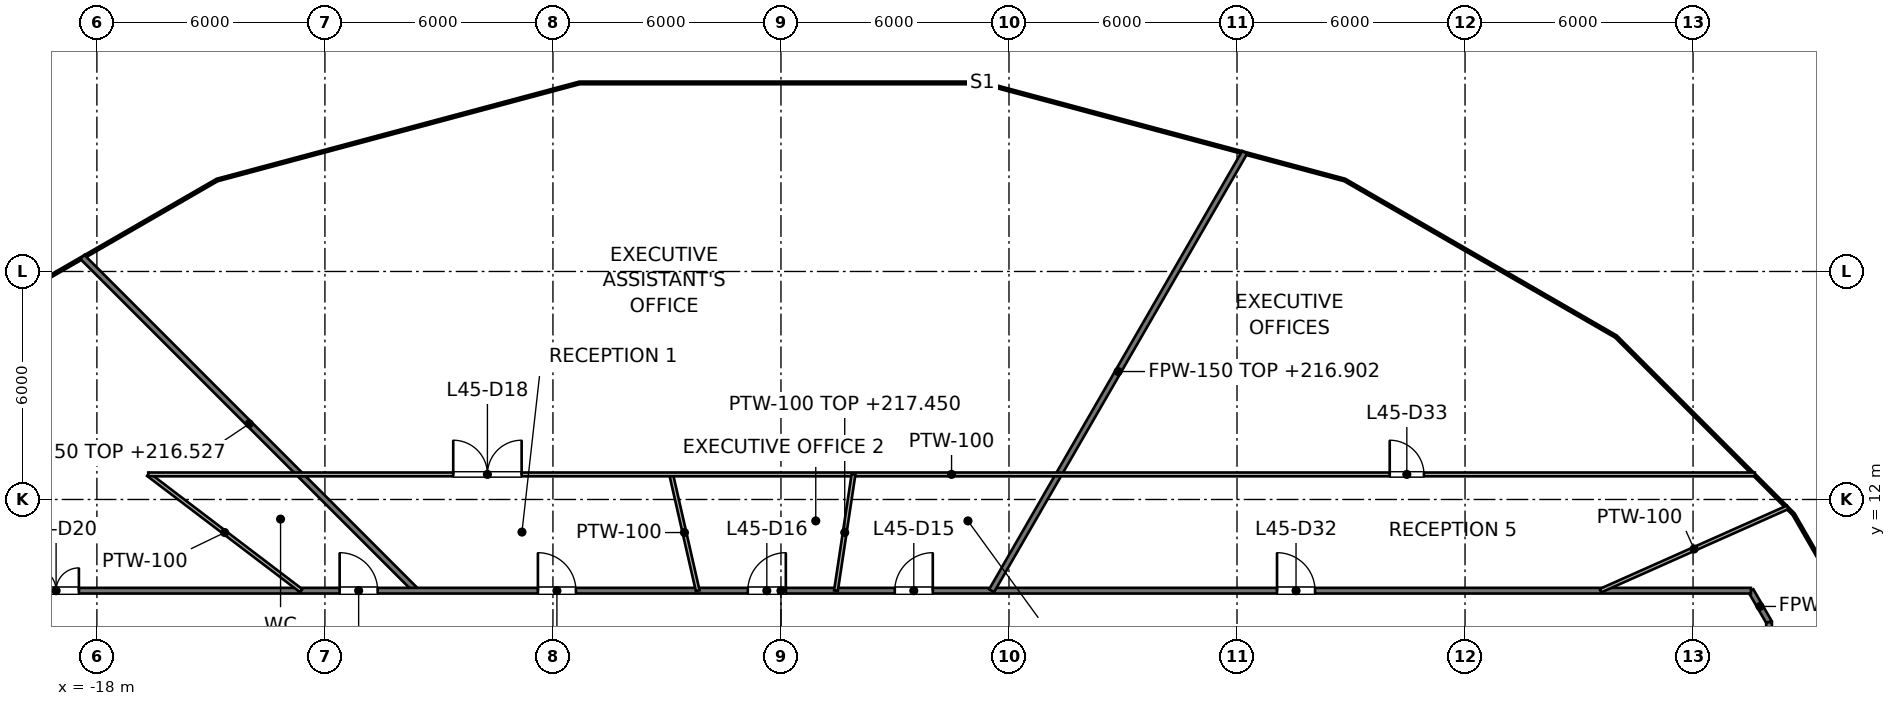
"""IFC4 building model, lengths in metres.
Left out: names, types, materials, properties, quantities, classifications, styles, units other than length and angle.
Written with IfcOpenShell. Run it as: python <this file> out.ifc"""

import sys

from ifc_helpers import new_model, si_unit, direction, frame, frame_2d, origin, place, context, subcontext, project, spatial, rectangle, extrude, element, fill, save


model = new_model("IFC4")
c1 = context("Model", 3, precision=1e-05, world=origin(), true_north=direction((0.0, 1.0)))
c2 = subcontext(c1, "Body", "Model", "MODEL_VIEW")
j1 = project(units=[si_unit("LENGTHUNIT", "METRE"), si_unit("PLANEANGLEUNIT", "RADIAN")], contexts=[c1])
p1 = place(None, origin())
s1 = spatial("IfcSite", under=j1, at=p1, CompositionType="ELEMENT")
p2 = place(p1, origin())
s2 = spatial("IfcBuilding", under=s1, at=p2, CompositionType="ELEMENT")
p3 = place(p2, frame((0.0, 0.0, 213.6)))
s3 = spatial("IfcBuildingStorey", under=s2, at=p3, CompositionType="ELEMENT", Elevation=213.6)
p4 = place(p3, frame((25.522, 9.6, 0.0), z_axis=(0.0, 0.0, 1.0), x_axis=(0.499980071345, -0.866036909293, 0.0)))
e1 = element("IfcWall", 1, at=p4, inside=s3, PredefinedType="PARTITIONING", context=c2, shape_type="SweptSolid", body=[
    extrude(rectangle(XDim=0.957, YDim=0.15, at=frame_2d((0.479, 0.0))), origin(), (0.0, 0.0, 1.0), 3.85),
])
p5 = place(p3, frame((-18.383, 18.383, 0.0), z_axis=(0.0, 0.0, 1.0), x_axis=(0.707106781187, -0.707106781187, 0.0)))
e2 = element("IfcWall", 2, at=p5, inside=s3, PredefinedType="PARTITIONING", context=c2, shape_type="SweptSolid", body=[
    extrude(rectangle(XDim=12.421, YDim=0.15, at=frame_2d((6.21, 0.0))), origin(), (0.0, 0.0, 1.0), 2.927),
])
p6 = place(p3, frame((-25.522, 9.6, 0.0), z_axis=(0.0, 0.0, 1.0), x_axis=(1.0, 0.0, 0.0)))
e3 = element("IfcWall", 3, at=p6, inside=s3, PredefinedType="PARTITIONING", context=c2, shape_type="SweptSolid", body=[
    extrude(rectangle(XDim=51.044, YDim=0.15, at=frame_2d((25.522, 0.0))), origin(), (0.0, 0.0, 1.0), 2.927),
])
p7 = place(p6, frame((28.517, 0.0, 0.0)))
e4 = element("IfcOpeningElement", 4, at=p7, cuts=e3, PredefinedType="OPENING", context=c2, shape_type="SweptSolid", body=[
    extrude(rectangle(XDim=1.0, YDim=2.1, at=frame_2d((0.5, 1.05))), frame((0.0, 0.075, 0.0), z_axis=(0.0, -1.0, 0.0), x_axis=(1.0, 0.0, 0.0)), (0.0, 0.0, 1.0), 0.15),
])
p8 = place(p6, frame((24.65, 0.0, 0.0)))
e5 = element("IfcOpeningElement", 5, at=p8, cuts=e3, PredefinedType="OPENING", context=c2, shape_type="SweptSolid", body=[
    extrude(rectangle(XDim=1.0, YDim=2.1, at=frame_2d((0.5, 1.05))), frame((0.0, 0.075, 0.0), z_axis=(0.0, -1.0, 0.0), x_axis=(1.0, 0.0, 0.0)), (0.0, 0.0, 1.0), 0.15),
])
p9 = place(p6, frame((19.126, 0.0, 0.0)))
e6 = element("IfcOpeningElement", 6, at=p9, cuts=e3, PredefinedType="OPENING", context=c2, shape_type="SweptSolid", body=[
    extrude(rectangle(XDim=1.0, YDim=2.1, at=frame_2d((0.5, 1.05))), frame((0.0, 0.075, 0.0), z_axis=(0.0, -1.0, 0.0), x_axis=(1.0, 0.0, 0.0)), (0.0, 0.0, 1.0), 0.15),
])
p10 = place(p6, frame((13.909, 0.0, 0.0)))
e7 = element("IfcOpeningElement", 7, at=p10, cuts=e3, PredefinedType="OPENING", context=c2, shape_type="SweptSolid", body=[
    extrude(rectangle(XDim=1.0, YDim=2.1, at=frame_2d((0.5, 1.05))), frame((0.0, 0.075, 0.0), z_axis=(0.0, -1.0, 0.0), x_axis=(1.0, 0.0, 0.0)), (0.0, 0.0, 1.0), 0.15),
])
p11 = place(p6, frame((5.848, 0.0, 0.0)))
e8 = element("IfcOpeningElement", 8, at=p11, cuts=e3, PredefinedType="OPENING", context=c2, shape_type="SweptSolid", body=[
    extrude(rectangle(XDim=1.2, YDim=2.1, at=frame_2d((0.6, 1.05))), frame((0.0, 0.075, 0.0), z_axis=(0.0, -1.0, 0.0), x_axis=(1.0, 0.0, 0.0)), (0.0, 0.0, 1.0), 0.15),
])
p12 = place(p6, frame((38.575, 0.0, 0.0)))
e9 = element("IfcOpeningElement", 9, at=p12, cuts=e3, PredefinedType="OPENING", context=c2, shape_type="SweptSolid", body=[
    extrude(rectangle(XDim=1.0, YDim=2.1, at=frame_2d((0.5, 1.05))), frame((0.0, 0.075, 0.0), z_axis=(0.0, -1.0, 0.0), x_axis=(1.0, 0.0, 0.0)), (0.0, 0.0, 1.0), 0.15),
])
p13 = place(p3, frame((5.543, 9.6, 0.0), z_axis=(0.0, 0.0, 1.0), x_axis=(0.499967881601, 0.866043946556, 0.0)))
e10 = element("IfcWall", 10, at=p13, inside=s3, PredefinedType="PARTITIONING", context=c2, shape_type="SweptSolid", body=[
    extrude(rectangle(XDim=13.318, YDim=0.15, at=frame_2d((6.659, 0.0))), origin(), (0.0, 0.0, 1.0), 3.302),
])
p14 = place(p3, frame((26.0, 6.8, 0.0), z_axis=(0.0, 0.0, 1.0), x_axis=(0.0, 1.0, 0.0)))
e11 = element("IfcWall", 11, at=p14, inside=s3, PredefinedType="PARTITIONING", context=c2, shape_type="SweptSolid", body=[
    extrude(rectangle(XDim=1.971, YDim=0.15, at=frame_2d((0.985, 0.0))), origin(), (0.0, 0.0, 1.0), 2.927),
])
p15 = place(p3, frame((-2.889, 12.66, 0.0), z_axis=(0.0, 0.0, 1.0), x_axis=(0.222404443897, -0.974954492956, 0.0)))
e12 = element("IfcWall", 12, at=p15, inside=s3, PredefinedType="PARTITIONING", context=c2, shape_type="SweptSolid", body=[
    extrude(rectangle(XDim=3.138, YDim=0.1, at=frame_2d((1.569, 0.0))), origin(), (0.0, 0.0, 1.0), 2.927),
])
p16 = place(p3, frame((-16.649, 12.66, 0.0), z_axis=(0.0, 0.0, 1.0), x_axis=(0.796006750332, -0.605287744322, 0.0)))
e13 = element("IfcWall", 13, at=p16, inside=s3, PredefinedType="PARTITIONING", context=c2, shape_type="SweptSolid", body=[
    extrude(rectangle(XDim=5.055, YDim=0.1, at=frame_2d((2.528, 0.0))), origin(), (0.0, 0.0, 1.0), 2.927),
])
p17 = place(p3, frame((-16.649, 12.66, 0.0), z_axis=(0.0, 0.0, 1.0), x_axis=(1.0, 0.0, 0.0)))
e14 = element("IfcWall", 14, at=p17, inside=s3, PredefinedType="PARTITIONING", context=c2, shape_type="SweptSolid", body=[
    extrude(rectangle(XDim=42.276, YDim=0.1, at=frame_2d((21.138, 0.0))), origin(), (0.0, 0.0, 1.0), 2.927),
])
p18 = place(p17, frame((8.025, 0.0, 0.0)))
e15 = element("IfcOpeningElement", 15, at=p18, cuts=e14, PredefinedType="OPENING", context=c2, shape_type="SweptSolid", body=[
    extrude(rectangle(XDim=1.8, YDim=2.1, at=frame_2d((0.9, 1.05))), frame((0.0, 0.05, 0.0), z_axis=(0.0, -1.0, 0.0), x_axis=(1.0, 0.0, 0.0)), (0.0, 0.0, 1.0), 0.1),
])
p19 = place(p17, frame((32.667, 0.0, 0.0)))
e16 = element("IfcOpeningElement", 16, at=p19, cuts=e14, PredefinedType="OPENING", context=c2, shape_type="SweptSolid", body=[
    extrude(rectangle(XDim=0.9, YDim=2.1, at=frame_2d((0.45, 1.05))), frame((0.0, 0.05, 0.0), z_axis=(0.0, -1.0, 0.0), x_axis=(1.0, 0.0, 0.0)), (0.0, 0.0, 1.0), 0.1),
])
p20 = place(p3, frame((21.563, 9.6, 0.0), z_axis=(0.0, 0.0, 1.0), x_axis=(0.91352396797, 0.406784906239, 0.0)))
e17 = element("IfcWall", 17, at=p20, inside=s3, PredefinedType="PARTITIONING", context=c2, shape_type="SweptSolid", body=[
    extrude(rectangle(XDim=5.396, YDim=0.1, at=frame_2d((2.698, 0.0))), origin(), (0.0, 0.0, 1.0), 2.927),
])
p21 = place(p3, frame((1.447, 9.6, 0.0), z_axis=(0.0, 0.0, 1.0), x_axis=(0.149270157498, 0.988796450277, 0.0)))
e18 = element("IfcWall", 18, at=p21, inside=s3, PredefinedType="PARTITIONING", context=c2, shape_type="SweptSolid", body=[
    extrude(rectangle(XDim=3.094, YDim=0.1, at=frame_2d((1.547, 0.0))), origin(), (0.0, 0.0, 1.0), 3.85),
])
p22 = place(p7, origin())
e19 = element("IfcDoor", 19, at=p22, inside=s3, OperationType="SINGLE_SWING_RIGHT", PredefinedType="DOOR", context=c2, shape_type="SweptSolid", body=[
    extrude(rectangle(XDim=1.0, YDim=2.1, at=frame_2d((0.5, 1.05))), frame((0.0, 0.025, 0.0), z_axis=(0.0, -1.0, 0.0), x_axis=(1.0, 0.0, 0.0)), (0.0, 0.0, 1.0), 0.05),
])
fill(e4, e19)
p23 = place(p8, origin())
e20 = element("IfcDoor", 20, at=p23, inside=s3, OperationType="SINGLE_SWING_RIGHT", PredefinedType="DOOR", context=c2, shape_type="SweptSolid", body=[
    extrude(rectangle(XDim=1.0, YDim=2.1, at=frame_2d((0.5, 1.05))), frame((0.0, 0.025, 0.0), z_axis=(0.0, -1.0, 0.0), x_axis=(1.0, 0.0, 0.0)), (0.0, 0.0, 1.0), 0.05),
])
fill(e5, e20)
p24 = place(p9, origin())
e21 = element("IfcDoor", 21, at=p24, inside=s3, OperationType="SINGLE_SWING_LEFT", PredefinedType="DOOR", context=c2, shape_type="SweptSolid", body=[
    extrude(rectangle(XDim=1.0, YDim=2.1, at=frame_2d((0.5, 1.05))), frame((0.0, 0.025, 0.0), z_axis=(0.0, -1.0, 0.0), x_axis=(1.0, 0.0, 0.0)), (0.0, 0.0, 1.0), 0.05),
])
fill(e6, e21)
p25 = place(p18, origin())
e22 = element("IfcDoor", 22, at=p25, inside=s3, OperationType="DOUBLE_DOOR_SINGLE_SWING", PredefinedType="DOOR", context=c2, shape_type="SweptSolid", body=[
    extrude(rectangle(XDim=1.8, YDim=2.1, at=frame_2d((0.9, 1.05))), frame((0.0, 0.025, 0.0), z_axis=(0.0, -1.0, 0.0), x_axis=(1.0, 0.0, 0.0)), (0.0, 0.0, 1.0), 0.05),
])
fill(e15, e22)
p26 = place(p10, origin())
e23 = element("IfcDoor", 23, at=p26, inside=s3, OperationType="SINGLE_SWING_LEFT", PredefinedType="DOOR", context=c2, shape_type="SweptSolid", body=[
    extrude(rectangle(XDim=1.0, YDim=2.1, at=frame_2d((0.5, 1.05))), frame((0.0, 0.025, 0.0), z_axis=(0.0, -1.0, 0.0), x_axis=(1.0, 0.0, 0.0)), (0.0, 0.0, 1.0), 0.05),
])
fill(e7, e23)
p27 = place(p11, origin())
e24 = element("IfcDoor", 24, at=p27, inside=s3, OperationType="DOUBLE_DOOR_SINGLE_SWING", PredefinedType="DOOR", context=c2, shape_type="SweptSolid", body=[
    extrude(rectangle(XDim=1.2, YDim=2.1, at=frame_2d((0.6, 1.05))), frame((0.0, 0.025, 0.0), z_axis=(0.0, -1.0, 0.0), x_axis=(1.0, 0.0, 0.0)), (0.0, 0.0, 1.0), 0.05),
])
fill(e8, e24)
p28 = place(p12, origin())
e25 = element("IfcDoor", 25, at=p28, inside=s3, OperationType="SINGLE_SWING_LEFT", PredefinedType="DOOR", context=c2, shape_type="SweptSolid", body=[
    extrude(rectangle(XDim=1.0, YDim=2.1, at=frame_2d((0.5, 1.05))), frame((0.0, 0.025, 0.0), z_axis=(0.0, -1.0, 0.0), x_axis=(1.0, 0.0, 0.0)), (0.0, 0.0, 1.0), 0.05),
])
fill(e9, e25)
p29 = place(p19, origin())
e26 = element("IfcDoor", 26, at=p29, inside=s3, OperationType="SINGLE_SWING_LEFT", PredefinedType="DOOR", context=c2, shape_type="SweptSolid", body=[
    extrude(rectangle(XDim=0.9, YDim=2.1, at=frame_2d((0.45, 1.05))), frame((0.0, 0.025, 0.0), z_axis=(0.0, -1.0, 0.0), x_axis=(1.0, 0.0, 0.0)), (0.0, 0.0, 1.0), 0.05),
])
fill(e16, e26)
save(model, sys.argv[1])
